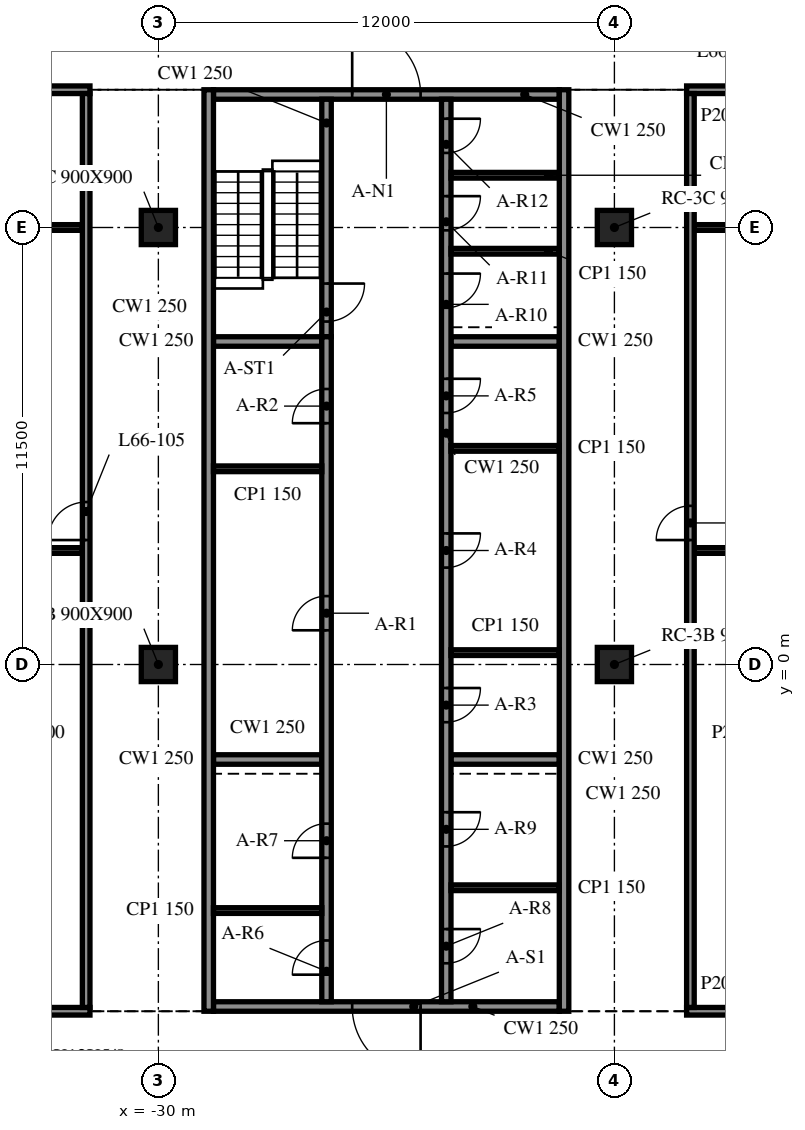
"""IFC4 building model, lengths in metres.
Left out: names, types, materials, properties, quantities, classifications, styles, units other than length and angle.
Written with IfcOpenShell. Run it as: python <this file> out.ifc"""

import sys

from ifc_helpers import new_model, si_unit, direction, frame, frame_2d, origin, origin_2d, place, context, subcontext, project, spatial, rectangle, extrude, element, fill, save


model = new_model("IFC4")
c1 = context("Model", 3, precision=1e-05, world=origin(), true_north=direction((0.0, 1.0)))
c2 = subcontext(c1, "Body", "Model", "MODEL_VIEW")
j1 = project(units=[si_unit("LENGTHUNIT", "METRE"), si_unit("PLANEANGLEUNIT", "RADIAN")], contexts=[c1])
p1 = place(None, origin())
s1 = spatial("IfcSite", under=j1, at=p1, CompositionType="ELEMENT")
p2 = place(p1, origin())
s2 = spatial("IfcBuilding", under=s1, at=p2, CompositionType="ELEMENT")
p3 = place(p2, frame((0.0, 0.0, 270.9)))
s3 = spatial("IfcBuildingStorey", under=s2, at=p3, CompositionType="ELEMENT", Elevation=270.9)
for number, where, z_axis, x_axis in (
    (1, (-30.0, 0.0, -0.34), (0.0, 0.0, 1.0), (1.0, 0.0, 0.0)),
    (2, (-30.0, 11.5, -0.34), (0.0, 0.0, 1.0), (1.0, 0.0, 0.0)),
    (3, (-18.0, 0.0, -0.34), (0.0, 0.0, 1.0), (1.0, 0.0, 0.0)),
    (4, (-18.0, 11.5, -0.34), (0.0, 0.0, 1.0), (1.0, 0.0, 0.0)),
):
    element("IfcColumn", number, at=place(p3, frame(where, z_axis=z_axis, x_axis=x_axis)), inside=s3, PredefinedType="COLUMN", context=c2, shape_type="SweptSolid", body=[
        extrude(rectangle(XDim=0.9, YDim=0.9, at=origin_2d()), origin(), (0.0, 0.0, 1.0), 3.8),
    ])
for number, where, z_axis, x_axis in (
    (5, (-28.675, 15.125, 0.0), (0.0, 0.0, 1.0), (0.0, -1.0, 0.0)),
    (6, (-19.325, -9.125, 0.0), (0.0, 0.0, 1.0), (0.0, 1.0, 0.0)),
):
    element("IfcWall", number, at=place(p3, frame(where, z_axis=z_axis, x_axis=x_axis)), inside=s3, PredefinedType="SOLIDWALL", context=c2, shape_type="SweptSolid", body=[
        extrude(rectangle(XDim=24.25, YDim=0.25, at=frame_2d((12.125, 0.0))), origin(), (0.0, 0.0, 1.0), 3.46),
    ])
p4 = place(p3, frame((-19.45, -9.0, 0.0), z_axis=(0.0, 0.0, 1.0), x_axis=(-1.0, 0.0, 0.0)))
e7 = element("IfcWall", 7, at=p4, inside=s3, PredefinedType="SOLIDWALL", context=c2, shape_type="SweptSolid", body=[
    extrude(rectangle(XDim=9.1, YDim=0.25, at=frame_2d((4.55, 0.0))), origin(), (0.0, 0.0, 1.0), 3.46),
])
p5 = place(p4, frame((3.65, 0.0, 0.0)))
e8 = element("IfcOpeningElement", 8, at=p5, cuts=e7, PredefinedType="OPENING", context=c2, shape_type="SweptSolid", body=[
    extrude(rectangle(XDim=1.8, YDim=2.1, at=frame_2d((0.9, 1.05))), frame((0.0, 0.135, 0.0), z_axis=(0.0, -1.0, 0.0), x_axis=(1.0, 0.0, 0.0)), (0.0, 0.0, 1.0), 0.27),
])
p6 = place(p3, frame((-28.55, 15.0, 0.0), z_axis=(0.0, 0.0, 1.0), x_axis=(1.0, 0.0, 0.0)))
e9 = element("IfcWall", 9, at=p6, inside=s3, PredefinedType="SOLIDWALL", context=c2, shape_type="SweptSolid", body=[
    extrude(rectangle(XDim=9.1, YDim=0.25, at=frame_2d((4.55, 0.0))), origin(), (0.0, 0.0, 1.0), 3.46),
])
p7 = place(p6, frame((3.65, 0.0, 0.0)))
e10 = element("IfcOpeningElement", 10, at=p7, cuts=e9, PredefinedType="OPENING", context=c2, shape_type="SweptSolid", body=[
    extrude(rectangle(XDim=1.8, YDim=2.1, at=frame_2d((0.9, 1.05))), frame((0.0, 0.135, 0.0), z_axis=(0.0, -1.0, 0.0), x_axis=(1.0, 0.0, 0.0)), (0.0, 0.0, 1.0), 0.27),
])
p8 = place(p3, frame((-25.575, -8.875, 0.0), z_axis=(0.0, 0.0, 1.0), x_axis=(0.0, 1.0, 0.0)))
e11 = element("IfcWall", 11, at=p8, inside=s3, PredefinedType="SOLIDWALL", context=c2, shape_type="SweptSolid", body=[
    extrude(rectangle(XDim=17.5, YDim=0.25, at=frame_2d((8.75, 0.0))), origin(), (0.0, 0.0, 1.0), 3.46),
])
p9 = place(p8, frame((9.775, 0.0, 0.0)))
e12 = element("IfcOpeningElement", 12, at=p9, cuts=e11, PredefinedType="OPENING", context=c2, shape_type="SweptSolid", body=[
    extrude(rectangle(XDim=0.9, YDim=2.1, at=frame_2d((0.45, 1.05))), frame((0.0, 0.135, 0.0), z_axis=(0.0, -1.0, 0.0), x_axis=(1.0, 0.0, 0.0)), (0.0, 0.0, 1.0), 0.27),
])
p10 = place(p8, frame((15.225, 0.0, 0.0)))
e13 = element("IfcOpeningElement", 13, at=p10, cuts=e11, PredefinedType="OPENING", context=c2, shape_type="SweptSolid", body=[
    extrude(rectangle(XDim=0.9, YDim=2.1, at=frame_2d((0.45, 1.05))), frame((0.0, 0.135, 0.0), z_axis=(0.0, -1.0, 0.0), x_axis=(1.0, 0.0, 0.0)), (0.0, 0.0, 1.0), 0.27),
])
p11 = place(p8, frame((0.712, 0.0, 0.0)))
e14 = element("IfcOpeningElement", 14, at=p11, cuts=e11, PredefinedType="OPENING", context=c2, shape_type="SweptSolid", body=[
    extrude(rectangle(XDim=0.9, YDim=2.1, at=frame_2d((0.45, 1.05))), frame((0.0, 0.135, 0.0), z_axis=(0.0, -1.0, 0.0), x_axis=(1.0, 0.0, 0.0)), (0.0, 0.0, 1.0), 0.27),
])
p12 = place(p8, frame((3.788, 0.0, 0.0)))
e15 = element("IfcOpeningElement", 15, at=p12, cuts=e11, PredefinedType="OPENING", context=c2, shape_type="SweptSolid", body=[
    extrude(rectangle(XDim=0.9, YDim=2.1, at=frame_2d((0.45, 1.05))), frame((0.0, 0.135, 0.0), z_axis=(0.0, -1.0, 0.0), x_axis=(1.0, 0.0, 0.0)), (0.0, 0.0, 1.0), 0.27),
])
p13 = place(p3, frame((-25.575, 14.875, 0.0), z_axis=(0.0, 0.0, 1.0), x_axis=(0.0, -1.0, 0.0)))
e16 = element("IfcWall", 16, at=p13, inside=s3, PredefinedType="SOLIDWALL", context=c2, shape_type="SweptSolid", body=[
    extrude(rectangle(XDim=6.25, YDim=0.25, at=frame_2d((3.125, 0.0))), origin(), (0.0, 0.0, 1.0), 3.46),
])
p14 = place(p13, frame((4.85, 0.0, 0.0)))
e17 = element("IfcOpeningElement", 17, at=p14, cuts=e16, PredefinedType="OPENING", context=c2, shape_type="SweptSolid", body=[
    extrude(rectangle(XDim=1.0, YDim=2.1, at=frame_2d((0.5, 1.05))), frame((0.0, 0.135, 0.0), z_axis=(0.0, -1.0, 0.0), x_axis=(1.0, 0.0, 0.0)), (0.0, 0.0, 1.0), 0.27),
])
p15 = place(p3, frame((-22.425, 14.875, 0.0), z_axis=(0.0, 0.0, 1.0), x_axis=(0.0, -1.0, 0.0)))
e18 = element("IfcWall", 18, at=p15, inside=s3, PredefinedType="SOLIDWALL", context=c2, shape_type="SweptSolid", body=[
    extrude(rectangle(XDim=23.75, YDim=0.25, at=frame_2d((11.875, 0.0))), origin(), (0.0, 0.0, 1.0), 3.46),
])
p16 = place(p15, frame((15.494, 0.0, 0.0)))
e19 = element("IfcOpeningElement", 19, at=p16, cuts=e18, PredefinedType="OPENING", context=c2, shape_type="SweptSolid", body=[
    extrude(rectangle(XDim=0.9, YDim=2.1, at=frame_2d((0.45, 1.05))), frame((0.0, 0.135, 0.0), z_axis=(0.0, -1.0, 0.0), x_axis=(1.0, 0.0, 0.0)), (0.0, 0.0, 1.0), 0.27),
])
p17 = place(p15, frame((11.425, 0.0, 0.0)))
e20 = element("IfcOpeningElement", 20, at=p17, cuts=e18, PredefinedType="OPENING", context=c2, shape_type="SweptSolid", body=[
    extrude(rectangle(XDim=0.9, YDim=2.1, at=frame_2d((0.45, 1.05))), frame((0.0, 0.135, 0.0), z_axis=(0.0, -1.0, 0.0), x_axis=(1.0, 0.0, 0.0)), (0.0, 0.0, 1.0), 0.27),
])
p18 = place(p15, frame((7.356, 0.0, 0.0)))
e21 = element("IfcOpeningElement", 21, at=p18, cuts=e18, PredefinedType="OPENING", context=c2, shape_type="SweptSolid", body=[
    extrude(rectangle(XDim=0.9, YDim=2.1, at=frame_2d((0.45, 1.05))), frame((0.0, 0.135, 0.0), z_axis=(0.0, -1.0, 0.0), x_axis=(1.0, 0.0, 0.0)), (0.0, 0.0, 1.0), 0.27),
])
p19 = place(p15, frame((21.837, 0.0, 0.0)))
e22 = element("IfcOpeningElement", 22, at=p19, cuts=e18, PredefinedType="OPENING", context=c2, shape_type="SweptSolid", body=[
    extrude(rectangle(XDim=0.9, YDim=2.1, at=frame_2d((0.45, 1.05))), frame((0.0, 0.135, 0.0), z_axis=(0.0, -1.0, 0.0), x_axis=(1.0, 0.0, 0.0)), (0.0, 0.0, 1.0), 0.27),
])
p20 = place(p15, frame((18.762, 0.0, 0.0)))
e23 = element("IfcOpeningElement", 23, at=p20, cuts=e18, PredefinedType="OPENING", context=c2, shape_type="SweptSolid", body=[
    extrude(rectangle(XDim=0.9, YDim=2.1, at=frame_2d((0.45, 1.05))), frame((0.0, 0.135, 0.0), z_axis=(0.0, -1.0, 0.0), x_axis=(1.0, 0.0, 0.0)), (0.0, 0.0, 1.0), 0.27),
])
p21 = place(p15, frame((4.587, 0.0, 0.0)))
e24 = element("IfcOpeningElement", 24, at=p21, cuts=e18, PredefinedType="OPENING", context=c2, shape_type="SweptSolid", body=[
    extrude(rectangle(XDim=0.9, YDim=2.1, at=frame_2d((0.45, 1.05))), frame((0.0, 0.135, 0.0), z_axis=(0.0, -1.0, 0.0), x_axis=(1.0, 0.0, 0.0)), (0.0, 0.0, 1.0), 0.27),
])
p22 = place(p15, frame((2.55, 0.0, 0.0)))
e25 = element("IfcOpeningElement", 25, at=p22, cuts=e18, PredefinedType="OPENING", context=c2, shape_type="SweptSolid", body=[
    extrude(rectangle(XDim=0.9, YDim=2.1, at=frame_2d((0.45, 1.05))), frame((0.0, 0.135, 0.0), z_axis=(0.0, -1.0, 0.0), x_axis=(1.0, 0.0, 0.0)), (0.0, 0.0, 1.0), 0.27),
])
p23 = place(p15, frame((0.512, 0.0, 0.0)))
e26 = element("IfcOpeningElement", 26, at=p23, cuts=e18, PredefinedType="OPENING", context=c2, shape_type="SweptSolid", body=[
    extrude(rectangle(XDim=0.9, YDim=2.1, at=frame_2d((0.45, 1.05))), frame((0.0, 0.135, 0.0), z_axis=(0.0, -1.0, 0.0), x_axis=(1.0, 0.0, 0.0)), (0.0, 0.0, 1.0), 0.27),
])
for number, where, z_axis, x_axis in (
    (27, (-28.55, -2.5, 0.0), (0.0, 0.0, 1.0), (1.0, 0.0, 0.0)),
    (28, (-28.55, 8.5, 0.0), (0.0, 0.0, 1.0), (1.0, 0.0, 0.0)),
    (29, (-22.3, -2.5, 0.0), (0.0, 0.0, 1.0), (1.0, 0.0, 0.0)),
    (30, (-22.3, 8.5, 0.0), (0.0, 0.0, 1.0), (1.0, 0.0, 0.0)),
):
    element("IfcWall", number, at=place(p3, frame(where, z_axis=z_axis, x_axis=x_axis)), inside=s3, PredefinedType="SOLIDWALL", context=c2, shape_type="SweptSolid", body=[
        extrude(rectangle(XDim=2.85, YDim=0.25, at=frame_2d((1.425, 0.0))), origin(), (0.0, 0.0, 1.0), 3.46),
    ])
for number, where, z_axis, x_axis in (
    (31, (-28.55, 5.15, 0.0), (0.0, 0.0, 1.0), (1.0, 0.0, 0.0)),
    (32, (-22.3, 0.312, 0.0), (0.0, 0.0, 1.0), (1.0, 0.0, 0.0)),
    (33, (-22.3, 5.688, 0.0), (0.0, 0.0, 1.0), (1.0, 0.0, 0.0)),
    (34, (-28.55, -6.475, 0.0), (0.0, 0.0, 1.0), (1.0, 0.0, 0.0)),
    (35, (-22.3, -5.875, 0.0), (0.0, 0.0, 1.0), (1.0, 0.0, 0.0)),
    (36, (-22.3, 10.875, 0.0), (0.0, 0.0, 1.0), (1.0, 0.0, 0.0)),
    (37, (-22.3, 12.875, 0.0), (0.0, 0.0, 1.0), (1.0, 0.0, 0.0)),
):
    element("IfcWall", number, at=place(p3, frame(where, z_axis=z_axis, x_axis=x_axis)), inside=s3, PredefinedType="PARTITIONING", context=c2, shape_type="SweptSolid", body=[
        extrude(rectangle(XDim=2.85, YDim=0.15, at=frame_2d((1.425, 0.0))), origin(), (0.0, 0.0, 1.0), 3.46),
    ])
p24 = place(p3, frame((-47.502, -9.125, 0.0), z_axis=(0.0, 0.0, 1.0), x_axis=(1.0, 0.0, 0.0)))
e38 = element("IfcWall", 38, at=p24, inside=s3, PredefinedType="PARTITIONING", context=c2, shape_type="SweptSolid", body=[
    extrude(rectangle(XDim=15.702, YDim=0.2, at=frame_2d((7.851, 0.0))), origin(), (0.0, 0.0, 1.0), 3.46),
])
p25 = place(p24, frame((7.3, 0.0, 0.0)))
e39 = element("IfcOpeningElement", 39, at=p25, cuts=e38, PredefinedType="OPENING", context=c2, shape_type="SweptSolid", body=[
    extrude(rectangle(XDim=1.0, YDim=2.1, at=frame_2d((0.5, 1.05))), frame((0.0, 0.11, 0.0), z_axis=(0.0, -1.0, 0.0), x_axis=(1.0, 0.0, 0.0)), (0.0, 0.0, 1.0), 0.22),
])
p26 = place(p3, frame((-16.1, -9.125, 0.0), z_axis=(0.0, 0.0, 1.0), x_axis=(1.0, 0.0, 0.0)))
e40 = element("IfcWall", 40, at=p26, inside=s3, PredefinedType="PARTITIONING", context=c2, shape_type="SweptSolid", body=[
    extrude(rectangle(XDim=8.1, YDim=0.2, at=frame_2d((4.05, 0.0))), origin(), (0.0, 0.0, 1.0), 3.46),
])
p27 = place(p26, frame((3.5, 0.0, 0.0)))
e41 = element("IfcOpeningElement", 41, at=p27, cuts=e40, PredefinedType="OPENING", context=c2, shape_type="SweptSolid", body=[
    extrude(rectangle(XDim=1.0, YDim=2.1, at=frame_2d((0.5, 1.05))), frame((0.0, 0.11, 0.0), z_axis=(0.0, -1.0, 0.0), x_axis=(1.0, 0.0, 0.0)), (0.0, 0.0, 1.0), 0.22),
])
p28 = place(p3, frame((-47.85, 3.0, 0.0), z_axis=(0.0, 0.0, 1.0), x_axis=(1.0, 0.0, 0.0)))
e42 = element("IfcWall", 42, at=p28, inside=s3, PredefinedType="PARTITIONING", context=c2, shape_type="SweptSolid", body=[
    extrude(rectangle(XDim=15.85, YDim=0.15, at=frame_2d((7.925, 0.0))), origin(), (0.0, 0.0, 1.0), 3.46),
])
p29 = place(p3, frame((-15.9, 3.0, 0.0), z_axis=(0.0, 0.0, 1.0), x_axis=(1.0, 0.0, 0.0)))
e43 = element("IfcWall", 43, at=p29, inside=s3, PredefinedType="PARTITIONING", context=c2, shape_type="SweptSolid", body=[
    extrude(rectangle(XDim=7.7, YDim=0.15, at=frame_2d((3.85, 0.0))), origin(), (0.0, 0.0, 1.0), 3.46),
])
p30 = place(p3, frame((-41.55, 11.5, 0.0), z_axis=(0.0, 0.0, 1.0), x_axis=(1.0, 0.0, 0.0)))
e44 = element("IfcWall", 44, at=p30, inside=s3, PredefinedType="PARTITIONING", context=c2, shape_type="SweptSolid", body=[
    extrude(rectangle(XDim=9.55, YDim=0.15, at=frame_2d((4.775, 0.0))), origin(), (0.0, 0.0, 1.0), 3.46),
])
p31 = place(p3, frame((-15.9, 11.5, 0.0), z_axis=(0.0, 0.0, 1.0), x_axis=(1.0, 0.0, 0.0)))
e45 = element("IfcWall", 45, at=p31, inside=s3, PredefinedType="PARTITIONING", context=c2, shape_type="SweptSolid", body=[
    extrude(rectangle(XDim=7.7, YDim=0.15, at=frame_2d((3.85, 0.0))), origin(), (0.0, 0.0, 1.0), 3.46),
])
p32 = place(p3, frame((-47.975, 15.125, 0.0), z_axis=(0.0, 0.0, 1.0), x_axis=(1.0, 0.0, 0.0)))
e46 = element("IfcWall", 46, at=p32, inside=s3, PredefinedType="PARTITIONING", context=c2, shape_type="SweptSolid", body=[
    extrude(rectangle(XDim=16.175, YDim=0.2, at=frame_2d((8.087, 0.0))), origin(), (0.0, 0.0, 1.0), 3.46),
])
p33 = place(p32, frame((7.5, 0.0, 0.0)))
e47 = element("IfcOpeningElement", 47, at=p33, cuts=e46, PredefinedType="OPENING", context=c2, shape_type="SweptSolid", body=[
    extrude(rectangle(XDim=1.0, YDim=2.1, at=frame_2d((0.5, 1.05))), frame((0.0, 0.11, 0.0), z_axis=(0.0, -1.0, 0.0), x_axis=(1.0, 0.0, 0.0)), (0.0, 0.0, 1.0), 0.22),
])
p34 = place(p3, frame((-16.1, 15.125, 0.0), z_axis=(0.0, 0.0, 1.0), x_axis=(1.0, 0.0, 0.0)))
e48 = element("IfcWall", 48, at=p34, inside=s3, PredefinedType="PARTITIONING", context=c2, shape_type="SweptSolid", body=[
    extrude(rectangle(XDim=8.1, YDim=0.2, at=frame_2d((4.05, 0.0))), origin(), (0.0, 0.0, 1.0), 3.46),
])
p35 = place(p34, frame((3.5, 0.0, 0.0)))
e49 = element("IfcOpeningElement", 49, at=p35, cuts=e48, PredefinedType="OPENING", context=c2, shape_type="SweptSolid", body=[
    extrude(rectangle(XDim=1.0, YDim=2.1, at=frame_2d((0.5, 1.05))), frame((0.0, 0.11, 0.0), z_axis=(0.0, -1.0, 0.0), x_axis=(1.0, 0.0, 0.0)), (0.0, 0.0, 1.0), 0.22),
])
p36 = place(p3, frame((-31.9, -9.025, 0.0), z_axis=(0.0, 0.0, 1.0), x_axis=(0.0, 1.0, 0.0)))
e50 = element("IfcWall", 50, at=p36, inside=s3, PredefinedType="PARTITIONING", context=c2, shape_type="SweptSolid", body=[
    extrude(rectangle(XDim=24.05, YDim=0.2, at=frame_2d((12.025, 0.0))), origin(), (0.0, 0.0, 1.0), 3.46),
])
p37 = place(p36, frame((12.3, 0.0, 0.0)))
e51 = element("IfcOpeningElement", 51, at=p37, cuts=e50, PredefinedType="OPENING", context=c2, shape_type="SweptSolid", body=[
    extrude(rectangle(XDim=1.0, YDim=2.1, at=frame_2d((0.5, 1.05))), frame((0.0, 0.11, 0.0), z_axis=(0.0, -1.0, 0.0), x_axis=(1.0, 0.0, 0.0)), (0.0, 0.0, 1.0), 0.22),
])
p38 = place(p3, frame((-16.0, -9.025, 0.0), z_axis=(0.0, 0.0, 1.0), x_axis=(0.0, 1.0, 0.0)))
e52 = element("IfcWall", 52, at=p38, inside=s3, PredefinedType="PARTITIONING", context=c2, shape_type="SweptSolid", body=[
    extrude(rectangle(XDim=24.05, YDim=0.2, at=frame_2d((12.025, 0.0))), origin(), (0.0, 0.0, 1.0), 3.46),
])
p39 = place(p38, frame((12.3, 0.0, 0.0)))
e53 = element("IfcOpeningElement", 53, at=p39, cuts=e52, PredefinedType="OPENING", context=c2, shape_type="SweptSolid", body=[
    extrude(rectangle(XDim=0.9, YDim=2.1, at=frame_2d((0.45, 1.05))), frame((0.0, 0.11, 0.0), z_axis=(0.0, -1.0, 0.0), x_axis=(1.0, 0.0, 0.0)), (0.0, 0.0, 1.0), 0.22),
])
p40 = place(p5, origin())
e54 = element("IfcDoor", 54, at=p40, inside=s3, OperationType="DOUBLE_DOOR_SINGLE_SWING", PredefinedType="DOOR", context=c2, shape_type="SweptSolid", body=[
    extrude(rectangle(XDim=1.8, YDim=2.1, at=frame_2d((0.9, 1.05))), frame((0.0, 0.025, 0.0), z_axis=(0.0, -1.0, 0.0), x_axis=(1.0, 0.0, 0.0)), (0.0, 0.0, 1.0), 0.05),
])
fill(e8, e54)
p41 = place(p7, origin())
e55 = element("IfcDoor", 55, at=p41, inside=s3, OperationType="DOUBLE_DOOR_SINGLE_SWING", PredefinedType="DOOR", context=c2, shape_type="SweptSolid", body=[
    extrude(rectangle(XDim=1.8, YDim=2.1, at=frame_2d((0.9, 1.05))), frame((0.0, 0.025, 0.0), z_axis=(0.0, -1.0, 0.0), x_axis=(1.0, 0.0, 0.0)), (0.0, 0.0, 1.0), 0.05),
])
fill(e10, e55)
p42 = place(p9, origin())
e56 = element("IfcDoor", 56, at=p42, inside=s3, OperationType="SINGLE_SWING_LEFT", PredefinedType="DOOR", context=c2, shape_type="SweptSolid", body=[
    extrude(rectangle(XDim=0.9, YDim=2.1, at=frame_2d((0.45, 1.05))), frame((0.0, 0.025, 0.0), z_axis=(0.0, -1.0, 0.0), x_axis=(1.0, 0.0, 0.0)), (0.0, 0.0, 1.0), 0.05),
])
fill(e12, e56)
p43 = place(p10, origin())
e57 = element("IfcDoor", 57, at=p43, inside=s3, OperationType="SINGLE_SWING_RIGHT", PredefinedType="DOOR", context=c2, shape_type="SweptSolid", body=[
    extrude(rectangle(XDim=0.9, YDim=2.1, at=frame_2d((0.45, 1.05))), frame((0.0, 0.025, 0.0), z_axis=(0.0, -1.0, 0.0), x_axis=(1.0, 0.0, 0.0)), (0.0, 0.0, 1.0), 0.05),
])
fill(e13, e57)
p44 = place(p16, origin())
e58 = element("IfcDoor", 58, at=p44, inside=s3, OperationType="SINGLE_SWING_LEFT", PredefinedType="DOOR", context=c2, shape_type="SweptSolid", body=[
    extrude(rectangle(XDim=0.9, YDim=2.1, at=frame_2d((0.45, 1.05))), frame((0.0, 0.025, 0.0), z_axis=(0.0, -1.0, 0.0), x_axis=(1.0, 0.0, 0.0)), (0.0, 0.0, 1.0), 0.05),
])
fill(e19, e58)
p45 = place(p17, origin())
e59 = element("IfcDoor", 59, at=p45, inside=s3, OperationType="SINGLE_SWING_RIGHT", PredefinedType="DOOR", context=c2, shape_type="SweptSolid", body=[
    extrude(rectangle(XDim=0.9, YDim=2.1, at=frame_2d((0.45, 1.05))), frame((0.0, 0.025, 0.0), z_axis=(0.0, -1.0, 0.0), x_axis=(1.0, 0.0, 0.0)), (0.0, 0.0, 1.0), 0.05),
])
fill(e20, e59)
p46 = place(p18, origin())
e60 = element("IfcDoor", 60, at=p46, inside=s3, OperationType="SINGLE_SWING_LEFT", PredefinedType="DOOR", context=c2, shape_type="SweptSolid", body=[
    extrude(rectangle(XDim=0.9, YDim=2.1, at=frame_2d((0.45, 1.05))), frame((0.0, 0.025, 0.0), z_axis=(0.0, -1.0, 0.0), x_axis=(1.0, 0.0, 0.0)), (0.0, 0.0, 1.0), 0.05),
])
fill(e21, e60)
p47 = place(p11, origin())
e61 = element("IfcDoor", 61, at=p47, inside=s3, OperationType="SINGLE_SWING_RIGHT", PredefinedType="DOOR", context=c2, shape_type="SweptSolid", body=[
    extrude(rectangle(XDim=0.9, YDim=2.1, at=frame_2d((0.45, 1.05))), frame((0.0, 0.025, 0.0), z_axis=(0.0, -1.0, 0.0), x_axis=(1.0, 0.0, 0.0)), (0.0, 0.0, 1.0), 0.05),
])
fill(e14, e61)
p48 = place(p12, origin())
e62 = element("IfcDoor", 62, at=p48, inside=s3, OperationType="SINGLE_SWING_LEFT", PredefinedType="DOOR", context=c2, shape_type="SweptSolid", body=[
    extrude(rectangle(XDim=0.9, YDim=2.1, at=frame_2d((0.45, 1.05))), frame((0.0, 0.025, 0.0), z_axis=(0.0, -1.0, 0.0), x_axis=(1.0, 0.0, 0.0)), (0.0, 0.0, 1.0), 0.05),
])
fill(e15, e62)
p49 = place(p19, origin())
e63 = element("IfcDoor", 63, at=p49, inside=s3, OperationType="SINGLE_SWING_RIGHT", PredefinedType="DOOR", context=c2, shape_type="SweptSolid", body=[
    extrude(rectangle(XDim=0.9, YDim=2.1, at=frame_2d((0.45, 1.05))), frame((0.0, 0.025, 0.0), z_axis=(0.0, -1.0, 0.0), x_axis=(1.0, 0.0, 0.0)), (0.0, 0.0, 1.0), 0.05),
])
fill(e22, e63)
p50 = place(p20, origin())
e64 = element("IfcDoor", 64, at=p50, inside=s3, OperationType="SINGLE_SWING_LEFT", PredefinedType="DOOR", context=c2, shape_type="SweptSolid", body=[
    extrude(rectangle(XDim=0.9, YDim=2.1, at=frame_2d((0.45, 1.05))), frame((0.0, 0.025, 0.0), z_axis=(0.0, -1.0, 0.0), x_axis=(1.0, 0.0, 0.0)), (0.0, 0.0, 1.0), 0.05),
])
fill(e23, e64)
p51 = place(p21, origin())
e65 = element("IfcDoor", 65, at=p51, inside=s3, OperationType="SINGLE_SWING_RIGHT", PredefinedType="DOOR", context=c2, shape_type="SweptSolid", body=[
    extrude(rectangle(XDim=0.9, YDim=2.1, at=frame_2d((0.45, 1.05))), frame((0.0, 0.025, 0.0), z_axis=(0.0, -1.0, 0.0), x_axis=(1.0, 0.0, 0.0)), (0.0, 0.0, 1.0), 0.05),
])
fill(e24, e65)
p52 = place(p22, origin())
e66 = element("IfcDoor", 66, at=p52, inside=s3, OperationType="SINGLE_SWING_LEFT", PredefinedType="DOOR", context=c2, shape_type="SweptSolid", body=[
    extrude(rectangle(XDim=0.9, YDim=2.1, at=frame_2d((0.45, 1.05))), frame((0.0, 0.025, 0.0), z_axis=(0.0, -1.0, 0.0), x_axis=(1.0, 0.0, 0.0)), (0.0, 0.0, 1.0), 0.05),
])
fill(e25, e66)
p53 = place(p23, origin())
e67 = element("IfcDoor", 67, at=p53, inside=s3, OperationType="SINGLE_SWING_RIGHT", PredefinedType="DOOR", context=c2, shape_type="SweptSolid", body=[
    extrude(rectangle(XDim=0.9, YDim=2.1, at=frame_2d((0.45, 1.05))), frame((0.0, 0.025, 0.0), z_axis=(0.0, -1.0, 0.0), x_axis=(1.0, 0.0, 0.0)), (0.0, 0.0, 1.0), 0.05),
])
fill(e26, e67)
p54 = place(p14, origin())
e68 = element("IfcDoor", 68, at=p54, inside=s3, OperationType="SINGLE_SWING_LEFT", PredefinedType="DOOR", context=c2, shape_type="SweptSolid", body=[
    extrude(rectangle(XDim=1.0, YDim=2.1, at=frame_2d((0.5, 1.05))), frame((0.0, 0.025, 0.0), z_axis=(0.0, -1.0, 0.0), x_axis=(1.0, 0.0, 0.0)), (0.0, 0.0, 1.0), 0.05),
])
fill(e17, e68)
p55 = place(p37, origin())
e69 = element("IfcDoor", 69, at=p55, inside=s3, OperationType="SINGLE_SWING_RIGHT", PredefinedType="DOOR", context=c2, shape_type="SweptSolid", body=[
    extrude(rectangle(XDim=1.0, YDim=2.1, at=frame_2d((0.5, 1.05))), frame((0.0, 0.025, 0.0), z_axis=(0.0, -1.0, 0.0), x_axis=(1.0, 0.0, 0.0)), (0.0, 0.0, 1.0), 0.05),
])
fill(e51, e69)
p56 = place(p39, origin())
e70 = element("IfcDoor", 70, at=p56, inside=s3, OperationType="SINGLE_SWING_LEFT", PredefinedType="DOOR", context=c2, shape_type="SweptSolid", body=[
    extrude(rectangle(XDim=0.9, YDim=2.1, at=frame_2d((0.45, 1.05))), frame((0.0, 0.025, 0.0), z_axis=(0.0, -1.0, 0.0), x_axis=(1.0, 0.0, 0.0)), (0.0, 0.0, 1.0), 0.05),
])
fill(e53, e70)
save(model, sys.argv[1])
